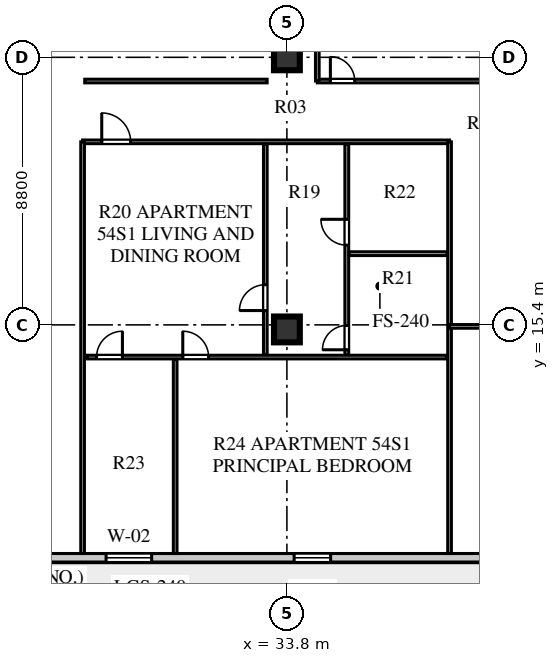
"""IFC4 building model, lengths in metres.
Left out: names, types, materials, properties, quantities, classifications, styles, units other than length and angle.
Written with IfcOpenShell. Run it as: python <this file> out.ifc"""

import sys

from ifc_helpers import new_model, si_unit, direction, frame, frame_2d, origin, origin_2d, place, context, subcontext, project, spatial, rectangle, extrude, element, fill, save


model = new_model("IFC4")
c1 = context("Model", 3, precision=1e-05, world=origin(), true_north=direction((0.0, 1.0)))
c2 = subcontext(c1, "Body", "Model", "MODEL_VIEW")
j1 = project(units=[si_unit("LENGTHUNIT", "METRE"), si_unit("PLANEANGLEUNIT", "RADIAN")], contexts=[c1])
p1 = place(None, origin())
s1 = spatial("IfcSite", under=j1, at=p1, CompositionType="ELEMENT")
p2 = place(p1, origin())
s2 = spatial("IfcBuilding", under=s1, at=p2, CompositionType="ELEMENT")
p3 = place(p2, frame((0.0, 0.0, 221.9)))
s3 = spatial("IfcBuildingStorey", under=s2, at=p3, CompositionType="ELEMENT", Elevation=221.9)
for number, where, z_axis, x_axis in (
    (1, (33.8, 15.25, 0.0), (0.0, 0.0, 1.0), (1.0, 0.0, 0.0)),
    (2, (33.8, 24.2, 0.0), (0.0, 0.0, 1.0), (1.0, 0.0, 0.0)),
):
    element("IfcColumn", number, at=place(p3, frame(where, z_axis=z_axis, x_axis=x_axis)), inside=s3, PredefinedType="COLUMN", context=c2, shape_type="SweptSolid", body=[
        extrude(rectangle(XDim=0.85, YDim=0.85, at=origin_2d()), origin(), (0.0, 0.0, 1.0), 3.66),
    ])
p4 = place(p3, frame((13.05, 7.74, 0.0), z_axis=(0.0, 0.0, 1.0), x_axis=(1.0, 0.0, 0.0)))
e3 = element("IfcWall", 3, at=p4, inside=s3, PredefinedType="STANDARD", context=c2, shape_type="SweptSolid", body=[
    extrude(rectangle(XDim=32.5, YDim=0.28, at=frame_2d((16.25, 0.0))), origin(), (0.0, 0.0, 1.0), 3.66),
])
p5 = place(p4, frame((0.95, 0.0, 0.0)))
e4 = element("IfcOpeningElement", 4, at=p5, cuts=e3, PredefinedType="OPENING", context=c2, shape_type="SweptSolid", body=[
    extrude(rectangle(XDim=1.0, YDim=2.05, at=frame_2d((0.5, 1.025))), frame((0.0, 0.15, 0.0), z_axis=(0.0, -1.0, 0.0), x_axis=(1.0, 0.0, 0.0)), (0.0, 0.0, 1.0), 0.3),
])
p6 = place(p4, frame((6.135, 0.0, 0.8)))
e5 = element("IfcOpeningElement", 5, at=p6, cuts=e3, PredefinedType="OPENING", context=c2, shape_type="SweptSolid", body=[
    extrude(rectangle(XDim=1.8, YDim=2.0, at=frame_2d((0.9, 1.0))), frame((0.0, 0.15, 0.0), z_axis=(0.0, -1.0, 0.0), x_axis=(1.0, 0.0, 0.0)), (0.0, 0.0, 1.0), 0.3),
])
p7 = place(p4, frame((14.802, 0.0, 0.8)))
e6 = element("IfcOpeningElement", 6, at=p7, cuts=e3, PredefinedType="OPENING", context=c2, shape_type="SweptSolid", body=[
    extrude(rectangle(XDim=1.5, YDim=2.0, at=frame_2d((0.75, 1.0))), frame((0.0, 0.15, 0.0), z_axis=(0.0, -1.0, 0.0), x_axis=(1.0, 0.0, 0.0)), (0.0, 0.0, 1.0), 0.3),
])
p8 = place(p4, frame((20.988, 0.0, 0.8)))
e7 = element("IfcOpeningElement", 7, at=p8, cuts=e3, PredefinedType="OPENING", context=c2, shape_type="SweptSolid", body=[
    extrude(rectangle(XDim=1.2, YDim=1.75, at=frame_2d((0.6, 0.875))), frame((0.0, 0.15, 0.0), z_axis=(0.0, -1.0, 0.0), x_axis=(1.0, 0.0, 0.0)), (0.0, 0.0, 1.0), 0.3),
])
p9 = place(p4, frame((28.045, 0.0, 0.8)))
e8 = element("IfcOpeningElement", 8, at=p9, cuts=e3, PredefinedType="OPENING", context=c2, shape_type="SweptSolid", body=[
    extrude(rectangle(XDim=2.4, YDim=2.05, at=frame_2d((1.2, 1.025))), frame((0.0, 0.15, 0.0), z_axis=(0.0, -1.0, 0.0), x_axis=(1.0, 0.0, 0.0)), (0.0, 0.0, 1.0), 0.3),
])
p10 = place(p3, frame((27.08, 21.42, 0.0), z_axis=(0.0, 0.0, 1.0), x_axis=(1.0, 0.0, 0.0)))
e9 = element("IfcWall", 9, at=p10, inside=s3, PredefinedType="PARTITIONING", context=c2, shape_type="SweptSolid", body=[
    extrude(rectangle(XDim=12.07, YDim=0.12, at=frame_2d((6.035, 0.0))), origin(), (0.0, 0.0, 1.0), 3.31),
])
p11 = place(p10, frame((0.63, 0.0, 0.0)))
e10 = element("IfcOpeningElement", 10, at=p11, cuts=e9, PredefinedType="OPENING", context=c2, shape_type="SweptSolid", body=[
    extrude(rectangle(XDim=0.95, YDim=2.1, at=frame_2d((0.475, 1.05))), frame((0.0, 0.07, 0.0), z_axis=(0.0, -1.0, 0.0), x_axis=(1.0, 0.0, 0.0)), (0.0, 0.0, 1.0), 0.14),
])
p12 = place(p3, frame((27.08, 7.88, 0.0), z_axis=(0.0, 0.0, 1.0), x_axis=(0.0, 1.0, 0.0)))
e11 = element("IfcWall", 11, at=p12, inside=s3, PredefinedType="PARTITIONING", context=c2, shape_type="SweptSolid", body=[
    extrude(rectangle(XDim=13.54, YDim=0.12, at=frame_2d((6.77, 0.0))), origin(), (0.0, 0.0, 1.0), 3.66),
])
p13 = place(p3, frame((27.15, 23.42, 0.0), z_axis=(0.0, 0.0, 1.0), x_axis=(1.0, 0.0, 0.0)))
e12 = element("IfcWall", 12, at=p13, inside=s3, PredefinedType="PARTITIONING", context=c2, shape_type="SweptSolid", body=[
    extrude(rectangle(XDim=6.0, YDim=0.12, at=frame_2d((3.0, 0.0))), origin(), (0.0, 0.0, 1.0), 3.66),
])
p14 = place(p3, frame((39.15, 7.88, 0.0), z_axis=(0.0, 0.0, 1.0), x_axis=(0.0, 1.0, 0.0)))
e13 = element("IfcWall", 13, at=p14, inside=s3, PredefinedType="PARTITIONING", context=c2, shape_type="SweptSolid", body=[
    extrude(rectangle(XDim=13.54, YDim=0.12, at=frame_2d((6.77, 0.0))), origin(), (0.0, 0.0, 1.0), 3.66),
])
p15 = place(p3, frame((27.24, 14.341, 0.0), z_axis=(0.0, 0.0, 1.0), x_axis=(1.0, 0.0, 0.0)))
e14 = element("IfcWall", 14, at=p15, inside=s3, PredefinedType="PARTITIONING", context=c2, shape_type="SweptSolid", body=[
    extrude(rectangle(XDim=11.83, YDim=0.12, at=frame_2d((5.915, 0.0))), origin(), (0.0, 0.0, 1.0), 3.66),
])
p16 = place(p15, frame((0.3, 0.0, 0.0)))
e15 = element("IfcOpeningElement", 15, at=p16, cuts=e14, PredefinedType="OPENING", context=c2, shape_type="SweptSolid", body=[
    extrude(rectangle(XDim=0.85, YDim=2.08, at=frame_2d((0.425, 1.04))), frame((0.0, 0.07, 0.0), z_axis=(0.0, -1.0, 0.0), x_axis=(1.0, 0.0, 0.0)), (0.0, 0.0, 1.0), 0.14),
])
p17 = place(p15, frame((3.135, 0.0, 0.0)))
e16 = element("IfcOpeningElement", 16, at=p17, cuts=e14, PredefinedType="OPENING", context=c2, shape_type="SweptSolid", body=[
    extrude(rectangle(XDim=0.85, YDim=2.08, at=frame_2d((0.425, 1.04))), frame((0.0, 0.07, 0.0), z_axis=(0.0, -1.0, 0.0), x_axis=(1.0, 0.0, 0.0)), (0.0, 0.0, 1.0), 0.14),
])
p18 = place(p3, frame((35.77, 14.421, 0.0), z_axis=(0.0, 0.0, 1.0), x_axis=(0.0, 1.0, 0.0)))
e17 = element("IfcWall", 17, at=p18, inside=s3, PredefinedType="PLUMBINGWALL", context=c2, shape_type="SweptSolid", body=[
    extrude(rectangle(XDim=6.919, YDim=0.125, at=frame_2d((3.459, 0.0))), origin(), (0.0, 0.0, 1.0), 3.66),
])
p19 = place(p18, frame((0.16, 0.0, 0.0)))
e18 = element("IfcOpeningElement", 18, at=p19, cuts=e17, PredefinedType="OPENING", context=c2, shape_type="SweptSolid", body=[
    extrude(rectangle(XDim=0.8, YDim=2.05, at=frame_2d((0.4, 1.025))), frame((0.0, 0.073, 0.0), z_axis=(0.0, -1.0, 0.0), x_axis=(1.0, 0.0, 0.0)), (0.0, 0.0, 1.0), 0.145),
])
p20 = place(p18, frame((3.601, 0.0, 0.0)))
e19 = element("IfcOpeningElement", 19, at=p20, cuts=e17, PredefinedType="OPENING", context=c2, shape_type="SweptSolid", body=[
    extrude(rectangle(XDim=0.85, YDim=2.08, at=frame_2d((0.425, 1.04))), frame((0.0, 0.073, 0.0), z_axis=(0.0, -1.0, 0.0), x_axis=(1.0, 0.0, 0.0)), (0.0, 0.0, 1.0), 0.145),
])
p21 = place(p3, frame((35.85, 17.742, 0.0), z_axis=(0.0, 0.0, 1.0), x_axis=(1.0, 0.0, 0.0)))
e20 = element("IfcWall", 20, at=p21, inside=s3, PredefinedType="PLUMBINGWALL", context=c2, shape_type="SweptSolid", body=[
    extrude(rectangle(XDim=3.22, YDim=0.125, at=frame_2d((1.61, 0.0))), origin(), (0.0, 0.0, 1.0), 3.66),
])
p22 = place(p3, frame((33.09, 14.421, 0.0), z_axis=(0.0, 0.0, 1.0), x_axis=(0.0, 1.0, 0.0)))
e21 = element("IfcWall", 21, at=p22, inside=s3, PredefinedType="PARTITIONING", context=c2, shape_type="SweptSolid", body=[
    extrude(rectangle(XDim=6.919, YDim=0.12, at=frame_2d((3.459, 0.0))), origin(), (0.0, 0.0, 1.0), 3.66),
])
p23 = place(p22, frame((1.45, 0.0, 0.0)))
e22 = element("IfcOpeningElement", 22, at=p23, cuts=e21, PredefinedType="OPENING", context=c2, shape_type="SweptSolid", body=[
    extrude(rectangle(XDim=0.85, YDim=2.08, at=frame_2d((0.425, 1.04))), frame((0.0, 0.07, 0.0), z_axis=(0.0, -1.0, 0.0), x_axis=(1.0, 0.0, 0.0)), (0.0, 0.0, 1.0), 0.14),
])
p24 = place(p3, frame((30.125, 7.88, 0.0), z_axis=(0.0, 0.0, 1.0), x_axis=(0.0, 1.0, 0.0)))
e23 = element("IfcWall", 23, at=p24, inside=s3, PredefinedType="PARTITIONING", context=c2, shape_type="SweptSolid", body=[
    extrude(rectangle(XDim=6.381, YDim=0.12, at=frame_2d((3.19, 0.0))), origin(), (0.0, 0.0, 1.0), 3.66),
])
p25 = place(p3, frame((39.15, 15.35, 0.0), z_axis=(0.0, 0.0, 1.0), x_axis=(1.0, 0.0, 0.0)))
e24 = element("IfcWall", 24, at=p25, inside=s3, PredefinedType="PARTITIONING", context=c2, shape_type="SweptSolid", body=[
    extrude(rectangle(XDim=11.37, YDim=0.12, at=frame_2d((5.685, 0.0))), origin(), (0.0, 0.0, 1.0), 3.06),
])
p26 = place(p3, frame((34.8, 23.42, 0.0), z_axis=(0.0, 0.0, 1.0), x_axis=(1.0, 0.0, 0.0)))
e25 = element("IfcWall", 25, at=p26, inside=s3, PredefinedType="PARTITIONING", context=c2, shape_type="SweptSolid", body=[
    extrude(rectangle(XDim=5.9, YDim=0.12, at=frame_2d((2.95, 0.0))), origin(), (0.0, 0.0, 1.0), 3.66),
])
p27 = place(p26, frame((0.43, 0.0, 0.0)))
e26 = element("IfcOpeningElement", 26, at=p27, cuts=e25, PredefinedType="OPENING", context=c2, shape_type="SweptSolid", body=[
    extrude(rectangle(XDim=0.8, YDim=2.05, at=frame_2d((0.4, 1.025))), frame((0.0, 0.07, 0.0), z_axis=(0.0, -1.0, 0.0), x_axis=(1.0, 0.0, 0.0)), (0.0, 0.0, 1.0), 0.14),
])
p28 = place(p3, frame((34.8, 23.42, 0.0), z_axis=(0.0, 0.0, 1.0), x_axis=(0.0, 1.0, 0.0)))
e27 = element("IfcWall", 27, at=p28, inside=s3, PredefinedType="PARTITIONING", context=c2, shape_type="SweptSolid", body=[
    extrude(rectangle(XDim=3.78, YDim=0.12, at=frame_2d((1.89, 0.0))), origin(), (0.0, 0.0, 1.0), 3.66),
])
p29 = place(p7, origin())
e28 = element("IfcWindow", 28, at=p29, inside=s3, PartitioningType="SINGLE_PANEL", PredefinedType="WINDOW", context=c2, shape_type="SweptSolid", body=[
    extrude(rectangle(XDim=1.5, YDim=2.0, at=frame_2d((0.75, 1.0))), frame((0.0, 0.03, 0.0), z_axis=(0.0, -1.0, 0.0), x_axis=(1.0, 0.0, 0.0)), (0.0, 0.0, 1.0), 0.06),
])
fill(e6, e28)
p30 = place(p8, origin())
e29 = element("IfcWindow", 29, at=p30, inside=s3, PartitioningType="SINGLE_PANEL", PredefinedType="WINDOW", context=c2, shape_type="SweptSolid", body=[
    extrude(rectangle(XDim=1.2, YDim=1.75, at=frame_2d((0.6, 0.875))), frame((0.0, 0.03, 0.0), z_axis=(0.0, -1.0, 0.0), x_axis=(1.0, 0.0, 0.0)), (0.0, 0.0, 1.0), 0.06),
])
fill(e7, e29)
p31 = place(p23, origin())
e30 = element("IfcDoor", 30, at=p31, inside=s3, OperationType="SINGLE_SWING_LEFT", PredefinedType="DOOR", context=c2, shape_type="SweptSolid", body=[
    extrude(rectangle(XDim=0.85, YDim=2.08, at=frame_2d((0.425, 1.04))), frame((0.0, 0.025, 0.0), z_axis=(0.0, -1.0, 0.0), x_axis=(1.0, 0.0, 0.0)), (0.0, 0.0, 1.0), 0.05),
])
fill(e22, e30)
p32 = place(p19, origin())
e31 = element("IfcDoor", 31, at=p32, inside=s3, OperationType="SINGLE_SWING_LEFT", PredefinedType="DOOR", context=c2, shape_type="SweptSolid", body=[
    extrude(rectangle(XDim=0.8, YDim=2.05, at=frame_2d((0.4, 1.025))), frame((0.0, 0.025, 0.0), z_axis=(0.0, -1.0, 0.0), x_axis=(1.0, 0.0, 0.0)), (0.0, 0.0, 1.0), 0.05),
])
fill(e18, e31)
p33 = place(p20, origin())
e32 = element("IfcDoor", 32, at=p33, inside=s3, OperationType="SINGLE_SWING_RIGHT", PredefinedType="DOOR", context=c2, shape_type="SweptSolid", body=[
    extrude(rectangle(XDim=0.85, YDim=2.08, at=frame_2d((0.425, 1.04))), frame((0.0, 0.025, 0.0), z_axis=(0.0, -1.0, 0.0), x_axis=(1.0, 0.0, 0.0)), (0.0, 0.0, 1.0), 0.05),
])
fill(e19, e32)
p34 = place(p16, frame((0.85, 0.0, 0.0), z_axis=(0.0, 0.0, 1.0), x_axis=(-1.0, 0.0, 0.0)))
e33 = element("IfcDoor", 33, at=p34, inside=s3, OperationType="SINGLE_SWING_LEFT", PredefinedType="DOOR", context=c2, shape_type="SweptSolid", body=[
    extrude(rectangle(XDim=0.85, YDim=2.08, at=frame_2d((0.425, 1.04))), frame((0.0, 0.025, 0.0), z_axis=(0.0, -1.0, 0.0), x_axis=(1.0, 0.0, 0.0)), (0.0, 0.0, 1.0), 0.05),
])
fill(e15, e33)
p35 = place(p17, frame((0.85, 0.0, 0.0), z_axis=(0.0, 0.0, 1.0), x_axis=(-1.0, 0.0, 0.0)))
e34 = element("IfcDoor", 34, at=p35, inside=s3, OperationType="SINGLE_SWING_RIGHT", PredefinedType="DOOR", context=c2, shape_type="SweptSolid", body=[
    extrude(rectangle(XDim=0.85, YDim=2.08, at=frame_2d((0.425, 1.04))), frame((0.0, 0.025, 0.0), z_axis=(0.0, -1.0, 0.0), x_axis=(1.0, 0.0, 0.0)), (0.0, 0.0, 1.0), 0.05),
])
fill(e16, e34)
p36 = place(p11, frame((0.95, 0.0, 0.0), z_axis=(0.0, 0.0, 1.0), x_axis=(-1.0, 0.0, 0.0)))
e35 = element("IfcDoor", 35, at=p36, inside=s3, OperationType="SINGLE_SWING_RIGHT", PredefinedType="DOOR", context=c2, shape_type="SweptSolid", body=[
    extrude(rectangle(XDim=0.95, YDim=2.1, at=frame_2d((0.475, 1.05))), frame((0.0, 0.025, 0.0), z_axis=(0.0, -1.0, 0.0), x_axis=(1.0, 0.0, 0.0)), (0.0, 0.0, 1.0), 0.05),
])
fill(e10, e35)
p37 = place(p27, origin())
e36 = element("IfcDoor", 36, at=p37, inside=s3, OperationType="SINGLE_SWING_LEFT", PredefinedType="DOOR", context=c2, shape_type="SweptSolid", body=[
    extrude(rectangle(XDim=0.8, YDim=2.05, at=frame_2d((0.4, 1.025))), frame((0.0, 0.025, 0.0), z_axis=(0.0, -1.0, 0.0), x_axis=(1.0, 0.0, 0.0)), (0.0, 0.0, 1.0), 0.05),
])
fill(e26, e36)
save(model, sys.argv[1])
